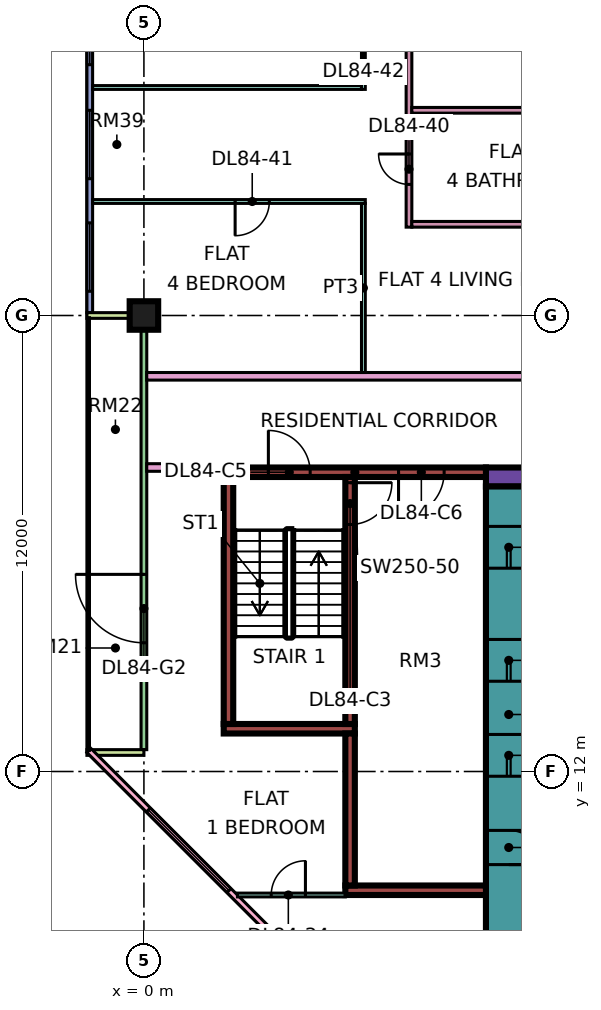
"""IFC4 building model, lengths in metres.
Left out: names, types, materials, properties, quantities, classifications, styles, units other than length and angle.
Written with IfcOpenShell. Run it as: python <this file> out.ifc"""

import sys

from ifc_helpers import new_model, si_unit, direction, frame, frame_2d, origin, origin_2d, place, context, subcontext, project, spatial, rectangle, extrude, element, fill, save


model = new_model("IFC4")
c1 = context("Model", 3, precision=1e-05, world=origin(), true_north=direction((0.0, 1.0)))
c2 = subcontext(c1, "Body", "Model", "MODEL_VIEW")
j1 = project(units=[si_unit("LENGTHUNIT", "METRE"), si_unit("PLANEANGLEUNIT", "RADIAN")], contexts=[c1])
p1 = place(None, origin())
s1 = spatial("IfcSite", under=j1, at=p1, CompositionType="ELEMENT")
p2 = place(p1, origin())
s2 = spatial("IfcBuilding", under=s1, at=p2, CompositionType="ELEMENT")
p3 = place(p2, frame((0.0, 0.0, 361.4)))
s3 = spatial("IfcBuildingStorey", under=s2, at=p3, CompositionType="ELEMENT", Elevation=361.4)
p4 = place(p3, frame((0.0, 24.0, 0.0), z_axis=(0.0, 0.0, 1.0), x_axis=(1.0, 0.0, 0.0)))
e1 = element("IfcColumn", 1, at=p4, inside=s3, PredefinedType="COLUMN", context=c2, shape_type="SweptSolid", body=[
    extrude(rectangle(XDim=0.75, YDim=0.75, at=origin_2d()), origin(), (0.0, 0.0, 1.0), 3.75),
])
p5 = place(p3, frame((9.0, 19.75, 0.0), z_axis=(0.0, 0.0, 1.0), x_axis=(1.0, 0.0, 0.0)))
e2 = element("IfcWall", 2, at=p5, inside=s3, PredefinedType="SHEAR", context=c2, shape_type="SweptSolid", body=[
    extrude(rectangle(XDim=25.0, YDim=0.5, at=frame_2d((12.5, 0.0))), origin(), (0.0, 0.0, 1.0), 3.75),
])
p6 = place(p5, frame((19.1, 0.0, 0.0)))
e3 = element("IfcOpeningElement", 3, at=p6, cuts=e2, PredefinedType="OPENING", context=c2, shape_type="SweptSolid", body=[
    extrude(rectangle(XDim=1.8, YDim=2.4, at=frame_2d((0.9, 1.2))), frame((0.0, 0.26, 0.0), z_axis=(0.0, -1.0, 0.0), x_axis=(1.0, 0.0, 0.0)), (0.0, 0.0, 1.0), 0.52),
])
p7 = place(p3, frame((9.6, 7.5, 0.0), z_axis=(0.0, 0.0, 1.0), x_axis=(0.0, 1.0, 0.0)))
e4 = element("IfcWall", 4, at=p7, inside=s3, PredefinedType="SHEAR", context=c2, shape_type="SweptSolid", body=[
    extrude(rectangle(XDim=12.0, YDim=1.2, at=frame_2d((6.0, 0.0))), origin(), (0.0, 0.0, 1.0), 3.75),
])
p8 = place(p7, frame((4.375, 0.0, 0.0)))
e5 = element("IfcOpeningElement", 5, at=p8, cuts=e4, PredefinedType="OPENING", context=c2, shape_type="SweptSolid", body=[
    extrude(rectangle(XDim=1.1, YDim=2.2, at=frame_2d((0.55, 1.1))), frame((0.0, 0.61, 0.0), z_axis=(0.0, -1.0, 0.0), x_axis=(1.0, 0.0, 0.0)), (0.0, 0.0, 1.0), 1.22),
])
p9 = place(p7, frame((6.875, 0.0, 0.0)))
e6 = element("IfcOpeningElement", 6, at=p9, cuts=e4, PredefinedType="OPENING", context=c2, shape_type="SweptSolid", body=[
    extrude(rectangle(XDim=1.1, YDim=2.2, at=frame_2d((0.55, 1.1))), frame((0.0, 0.61, 0.0), z_axis=(0.0, -1.0, 0.0), x_axis=(1.0, 0.0, 0.0)), (0.0, 0.0, 1.0), 1.22),
])
p10 = place(p7, frame((9.85, 0.0, 0.0)))
e7 = element("IfcOpeningElement", 7, at=p10, cuts=e4, PredefinedType="OPENING", context=c2, shape_type="SweptSolid", body=[
    extrude(rectangle(XDim=1.1, YDim=2.2, at=frame_2d((0.55, 1.1))), frame((0.0, 0.61, 0.0), z_axis=(0.0, -1.0, 0.0), x_axis=(1.0, 0.0, 0.0)), (0.0, 0.0, 1.0), 1.22),
])
p11 = place(p7, frame((2.05, 0.0, 0.0)))
e8 = element("IfcOpeningElement", 8, at=p11, cuts=e4, PredefinedType="OPENING", context=c2, shape_type="SweptSolid", body=[
    extrude(rectangle(XDim=0.9, YDim=2.1, at=frame_2d((0.45, 1.05))), frame((0.0, 0.61, 0.0), z_axis=(0.0, -1.0, 0.0), x_axis=(1.0, 0.0, 0.0)), (0.0, 0.0, 1.0), 1.22),
])
p12 = place(p3, frame((2.1, 19.875, 0.0), z_axis=(0.0, 0.0, 1.0), x_axis=(1.0, 0.0, 0.0)))
e9 = element("IfcWall", 9, at=p12, inside=s3, PredefinedType="SHEAR", context=c2, shape_type="SweptSolid", body=[
    extrude(rectangle(XDim=6.9, YDim=0.25, at=frame_2d((3.45, 0.0))), origin(), (0.0, 0.0, 1.0), 3.75),
])
p13 = place(p12, frame((1.175, 0.0, 0.0)))
e10 = element("IfcOpeningElement", 10, at=p13, cuts=e9, PredefinedType="OPENING", context=c2, shape_type="SweptSolid", body=[
    extrude(rectangle(XDim=1.1, YDim=2.2, at=frame_2d((0.55, 1.1))), frame((0.0, 0.135, 0.0), z_axis=(0.0, -1.0, 0.0), x_axis=(1.0, 0.0, 0.0)), (0.0, 0.0, 1.0), 0.27),
])
p14 = place(p12, frame((4.6, 0.0, 0.0)))
e11 = element("IfcOpeningElement", 11, at=p14, cuts=e9, PredefinedType="OPENING", context=c2, shape_type="SweptSolid", body=[
    extrude(rectangle(XDim=1.2, YDim=2.2, at=frame_2d((0.6, 1.1))), frame((0.0, 0.135, 0.0), z_axis=(0.0, -1.0, 0.0), x_axis=(1.0, 0.0, 0.0)), (0.0, 0.0, 1.0), 0.27),
])
p15 = place(p3, frame((2.1, 13.125, 0.0), z_axis=(0.0, 0.0, 1.0), x_axis=(1.0, 0.0, 0.0)))
e12 = element("IfcWall", 12, at=p15, inside=s3, PredefinedType="SHEAR", context=c2, shape_type="SweptSolid", body=[
    extrude(rectangle(XDim=3.45, YDim=0.25, at=frame_2d((1.725, 0.0))), origin(), (0.0, 0.0, 1.0), 3.75),
])
p16 = place(p3, frame((2.225, 13.25, 0.0), z_axis=(0.0, 0.0, 1.0), x_axis=(0.0, 1.0, 0.0)))
e13 = element("IfcWall", 13, at=p16, inside=s3, PredefinedType="SHEAR", context=c2, shape_type="SweptSolid", body=[
    extrude(rectangle(XDim=6.5, YDim=0.25, at=frame_2d((3.25, 0.0))), origin(), (0.0, 0.0, 1.0), 3.75),
])
p17 = place(p3, frame((5.425, 13.25, 0.0), z_axis=(0.0, 0.0, 1.0), x_axis=(0.0, 1.0, 0.0)))
e14 = element("IfcWall", 14, at=p17, inside=s3, PredefinedType="SHEAR", context=c2, shape_type="SweptSolid", body=[
    extrude(rectangle(XDim=6.5, YDim=0.25, at=frame_2d((3.25, 0.0))), origin(), (0.0, 0.0, 1.0), 3.75),
])
p18 = place(p17, frame((5.25, 0.0, 0.0)))
e15 = element("IfcOpeningElement", 15, at=p18, cuts=e14, PredefinedType="OPENING", context=c2, shape_type="SweptSolid", body=[
    extrude(rectangle(XDim=1.1, YDim=2.2, at=frame_2d((0.55, 1.1))), frame((0.0, 0.135, 0.0), z_axis=(0.0, -1.0, 0.0), x_axis=(1.0, 0.0, 0.0)), (0.0, 0.0, 1.0), 0.27),
])
p19 = place(p3, frame((5.3, 8.875, 0.0), z_axis=(0.0, 0.0, 1.0), x_axis=(1.0, 0.0, 0.0)))
e16 = element("IfcWall", 16, at=p19, inside=s3, PredefinedType="SHEAR", context=c2, shape_type="SweptSolid", body=[
    extrude(rectangle(XDim=3.7, YDim=0.25, at=frame_2d((1.85, 0.0))), origin(), (0.0, 0.0, 1.0), 3.75),
])
p20 = place(p3, frame((5.425, 9.0, 0.0), z_axis=(0.0, 0.0, 1.0), x_axis=(0.0, 1.0, 0.0)))
e17 = element("IfcWall", 17, at=p20, inside=s3, PredefinedType="SHEAR", context=c2, shape_type="SweptSolid", body=[
    extrude(rectangle(XDim=4.0, YDim=0.25, at=frame_2d((2.0, 0.0))), origin(), (0.0, 0.0, 1.0), 3.75),
])
p21 = place(p3, frame((-1.425, 35.925, 0.0), z_axis=(0.0, 0.0, 1.0), x_axis=(0.0, -1.0, 0.0)))
e18 = element("IfcWall", 18, at=p21, inside=s3, PredefinedType="SOLIDWALL", context=c2, shape_type="SweptSolid", body=[
    extrude(rectangle(XDim=11.85, YDim=0.15, at=frame_2d((5.925, 0.0))), origin(), (0.0, 0.0, 1.0), 3.35),
])
p22 = place(p21, frame((0.562, 0.0, 0.45)))
e19 = element("IfcOpeningElement", 19, at=p22, cuts=e18, PredefinedType="OPENING", context=c2, shape_type="SweptSolid", body=[
    extrude(rectangle(XDim=1.8, YDim=2.4, at=frame_2d((0.9, 1.2))), frame((0.0, 0.085, 0.0), z_axis=(0.0, -1.0, 0.0), x_axis=(1.0, 0.0, 0.0)), (0.0, 0.0, 1.0), 0.17),
])
p23 = place(p21, frame((3.525, 0.0, 0.45)))
e20 = element("IfcOpeningElement", 20, at=p23, cuts=e18, PredefinedType="OPENING", context=c2, shape_type="SweptSolid", body=[
    extrude(rectangle(XDim=1.8, YDim=2.4, at=frame_2d((0.9, 1.2))), frame((0.0, 0.085, 0.0), z_axis=(0.0, -1.0, 0.0), x_axis=(1.0, 0.0, 0.0)), (0.0, 0.0, 1.0), 0.17),
])
p24 = place(p21, frame((6.525, 0.0, 0.45)))
e21 = element("IfcOpeningElement", 21, at=p24, cuts=e18, PredefinedType="OPENING", context=c2, shape_type="SweptSolid", body=[
    extrude(rectangle(XDim=1.8, YDim=2.4, at=frame_2d((0.9, 1.2))), frame((0.0, 0.085, 0.0), z_axis=(0.0, -1.0, 0.0), x_axis=(1.0, 0.0, 0.0)), (0.0, 0.0, 1.0), 0.17),
])
p25 = place(p21, frame((9.488, 0.0, 0.45)))
e22 = element("IfcOpeningElement", 22, at=p25, cuts=e18, PredefinedType="OPENING", context=c2, shape_type="SweptSolid", body=[
    extrude(rectangle(XDim=1.8, YDim=2.4, at=frame_2d((0.9, 1.2))), frame((0.0, 0.085, 0.0), z_axis=(0.0, -1.0, 0.0), x_axis=(1.0, 0.0, 0.0)), (0.0, 0.0, 1.0), 0.17),
])
p26 = place(p3, frame((0.0, 23.925, 0.0), z_axis=(0.0, 0.0, 1.0), x_axis=(0.0, -1.0, 0.0)))
e23 = element("IfcWall", 23, at=p26, inside=s3, PredefinedType="SOLIDWALL", context=c2, shape_type="SweptSolid", body=[
    extrude(rectangle(XDim=11.35, YDim=0.15, at=frame_2d((5.675, 0.0))), origin(), (0.0, 0.0, 1.0), 3.35),
])
p27 = place(p26, frame((6.738, 0.0, 0.0)))
e24 = element("IfcOpeningElement", 24, at=p27, cuts=e23, PredefinedType="OPENING", context=c2, shape_type="SweptSolid", body=[
    extrude(rectangle(XDim=1.8, YDim=2.4, at=frame_2d((0.9, 1.2))), frame((0.0, 0.085, 0.0), z_axis=(0.0, -1.0, 0.0), x_axis=(1.0, 0.0, 0.0)), (0.0, 0.0, 1.0), 0.17),
])
for number, where, z_axis, x_axis in (
    (25, (-1.5, 24.0, 0.0), (0.0, 0.0, 1.0), (1.0, 0.0, 0.0)),
    (26, (-1.5, 12.5, 0.0), (0.0, 0.0, 1.0), (1.0, 0.0, 0.0)),
):
    element("IfcWall", number, at=place(p3, frame(where, z_axis=z_axis, x_axis=x_axis)), inside=s3, PredefinedType="SOLIDWALL", context=c2, shape_type="SweptSolid", body=[
        extrude(rectangle(XDim=1.5, YDim=0.15, at=frame_2d((0.75, 0.0))), origin(), (0.0, 0.0, 1.0), 3.35),
    ])
p28 = place(p3, frame((-1.447, 12.553, 0.0), z_axis=(0.0, 0.0, 1.0), x_axis=(0.707106781187, -0.707106781187, 0.0)))
e27 = element("IfcWall", 27, at=p28, inside=s3, PredefinedType="SOLIDWALL", context=c2, shape_type="SweptSolid", body=[
    extrude(rectangle(XDim=19.799, YDim=0.15, at=frame_2d((9.899, 0.0))), origin(), (0.0, 0.0, 1.0), 3.35),
])
p29 = place(p28, frame((2.212, 0.0, 0.45)))
e28 = element("IfcOpeningElement", 28, at=p29, cuts=e27, PredefinedType="OPENING", context=c2, shape_type="SweptSolid", body=[
    extrude(rectangle(XDim=3.0, YDim=2.4, at=frame_2d((1.5, 1.2))), frame((0.0, 0.085, 0.0), z_axis=(0.0, -1.0, 0.0), x_axis=(1.0, 0.0, 0.0)), (0.0, 0.0, 1.0), 0.17),
])
p30 = place(p28, frame((10.216, 0.0, 0.45)))
e29 = element("IfcOpeningElement", 29, at=p30, cuts=e27, PredefinedType="OPENING", context=c2, shape_type="SweptSolid", body=[
    extrude(rectangle(XDim=3.0, YDim=2.4, at=frame_2d((1.5, 1.2))), frame((0.0, 0.085, 0.0), z_axis=(0.0, -1.0, 0.0), x_axis=(1.0, 0.0, 0.0)), (0.0, 0.0, 1.0), 0.17),
])
p31 = place(p3, frame((-1.35, 27.0, 0.0), z_axis=(0.0, 0.0, 1.0), x_axis=(1.0, 0.0, 0.0)))
e30 = element("IfcWall", 30, at=p31, inside=s3, PredefinedType="PARTITIONING", context=c2, shape_type="SweptSolid", body=[
    extrude(rectangle(XDim=7.175, YDim=0.1, at=frame_2d((3.587, 0.0))), origin(), (0.0, 0.0, 1.0), 3.35),
])
p32 = place(p31, frame((3.75, 0.0, 0.0)))
e31 = element("IfcOpeningElement", 31, at=p32, cuts=e30, PredefinedType="OPENING", context=c2, shape_type="SweptSolid", body=[
    extrude(rectangle(XDim=0.9, YDim=2.1, at=frame_2d((0.45, 1.05))), frame((0.0, 0.06, 0.0), z_axis=(0.0, -1.0, 0.0), x_axis=(1.0, 0.0, 0.0)), (0.0, 0.0, 1.0), 0.12),
])
p33 = place(p3, frame((-1.35, 30.0, 0.0), z_axis=(0.0, 0.0, 1.0), x_axis=(1.0, 0.0, 0.0)))
e32 = element("IfcWall", 32, at=p33, inside=s3, PredefinedType="PARTITIONING", context=c2, shape_type="SweptSolid", body=[
    extrude(rectangle(XDim=7.075, YDim=0.1, at=frame_2d((3.538, 0.0))), origin(), (0.0, 0.0, 1.0), 3.35),
])
p34 = place(p3, frame((0.074, 20.0, 0.0), z_axis=(0.0, 0.0, 1.0), x_axis=(1.0, 0.0, 0.0)))
e33 = element("IfcWall", 33, at=p34, inside=s3, PredefinedType="PARTITIONING", context=c2, shape_type="SweptSolid", body=[
    extrude(rectangle(XDim=2.026, YDim=0.2, at=frame_2d((1.013, 0.0))), origin(), (0.0, 0.0, 1.0), 3.35),
])
p35 = place(p3, frame((0.074, 22.4, 0.0), z_axis=(0.0, 0.0, 1.0), x_axis=(1.0, 0.0, 0.0)))
e34 = element("IfcWall", 34, at=p35, inside=s3, PredefinedType="PARTITIONING", context=c2, shape_type="SweptSolid", body=[
    extrude(rectangle(XDim=12.201, YDim=0.2, at=frame_2d((6.101, 0.0))), origin(), (0.0, 0.0, 1.0), 3.35),
])
p36 = place(p3, frame((2.461, 8.75, 0.0), z_axis=(0.0, 0.0, 1.0), x_axis=(1.0, 0.0, 0.0)))
e35 = element("IfcWall", 35, at=p36, inside=s3, PredefinedType="PARTITIONING", context=c2, shape_type="SweptSolid", body=[
    extrude(rectangle(XDim=2.839, YDim=0.1, at=frame_2d((1.419, 0.0))), origin(), (0.0, 0.0, 1.0), 3.35),
])
p37 = place(p36, frame((0.889, 0.0, 0.0)))
e36 = element("IfcOpeningElement", 36, at=p37, cuts=e35, PredefinedType="OPENING", context=c2, shape_type="SweptSolid", body=[
    extrude(rectangle(XDim=0.9, YDim=2.1, at=frame_2d((0.45, 1.05))), frame((0.0, 0.06, 0.0), z_axis=(0.0, -1.0, 0.0), x_axis=(1.0, 0.0, 0.0)), (0.0, 0.0, 1.0), 0.12),
])
p38 = place(p3, frame((5.775, 22.5, 0.0), z_axis=(0.0, 0.0, 1.0), x_axis=(0.0, 1.0, 0.0)))
e37 = element("IfcWall", 37, at=p38, inside=s3, PredefinedType="PARTITIONING", context=c2, shape_type="SweptSolid", body=[
    extrude(rectangle(XDim=4.45, YDim=0.1, at=frame_2d((2.225, 0.0))), origin(), (0.0, 0.0, 1.0), 3.35),
])
p39 = place(p3, frame((5.775, 29.95, 0.0), z_axis=(0.0, 0.0, 1.0), x_axis=(0.0, 1.0, 0.0)))
e38 = element("IfcWall", 38, at=p39, inside=s3, PredefinedType="PARTITIONING", context=c2, shape_type="SweptSolid", body=[
    extrude(rectangle(XDim=5.95, YDim=0.1, at=frame_2d((2.975, 0.0))), origin(), (0.0, 0.0, 1.0), 3.35),
])
p40 = place(p39, frame((1.1, 0.0, 0.0)))
e39 = element("IfcOpeningElement", 39, at=p40, cuts=e38, PredefinedType="OPENING", context=c2, shape_type="SweptSolid", body=[
    extrude(rectangle(XDim=0.9, YDim=2.1, at=frame_2d((0.45, 1.05))), frame((0.0, 0.06, 0.0), z_axis=(0.0, -1.0, 0.0), x_axis=(1.0, 0.0, 0.0)), (0.0, 0.0, 1.0), 0.12),
])
p41 = place(p39, frame((4.1, 0.0, 0.0)))
e40 = element("IfcOpeningElement", 40, at=p41, cuts=e38, PredefinedType="OPENING", context=c2, shape_type="SweptSolid", body=[
    extrude(rectangle(XDim=0.9, YDim=2.1, at=frame_2d((0.45, 1.05))), frame((0.0, 0.06, 0.0), z_axis=(0.0, -1.0, 0.0), x_axis=(1.0, 0.0, 0.0)), (0.0, 0.0, 1.0), 0.12),
])
p42 = place(p3, frame((6.975, 26.325, 0.0), z_axis=(0.0, 0.0, 1.0), x_axis=(0.0, 1.0, 0.0)))
e41 = element("IfcWall", 41, at=p42, inside=s3, PredefinedType="PARTITIONING", context=c2, shape_type="SweptSolid", body=[
    extrude(rectangle(XDim=9.575, YDim=0.15, at=frame_2d((4.788, 0.0))), origin(), (0.0, 0.0, 1.0), 3.35),
])
p43 = place(p42, frame((1.125, 0.0, 0.0)))
e42 = element("IfcOpeningElement", 42, at=p43, cuts=e41, PredefinedType="OPENING", context=c2, shape_type="SweptSolid", body=[
    extrude(rectangle(XDim=0.8, YDim=2.1, at=frame_2d((0.4, 1.05))), frame((0.0, 0.085, 0.0), z_axis=(0.0, -1.0, 0.0), x_axis=(1.0, 0.0, 0.0)), (0.0, 0.0, 1.0), 0.17),
])
p44 = place(p42, frame((5.925, 0.0, 0.0)))
e43 = element("IfcOpeningElement", 43, at=p44, cuts=e41, PredefinedType="OPENING", context=c2, shape_type="SweptSolid", body=[
    extrude(rectangle(XDim=0.9, YDim=2.1, at=frame_2d((0.45, 1.05))), frame((0.0, 0.085, 0.0), z_axis=(0.0, -1.0, 0.0), x_axis=(1.0, 0.0, 0.0)), (0.0, 0.0, 1.0), 0.17),
])
for number, where, z_axis, x_axis in (
    (44, (7.05, 26.4, 0.0), (0.0, 0.0, 1.0), (1.0, 0.0, 0.0)),
    (45, (7.05, 29.4, 0.0), (0.0, 0.0, 1.0), (1.0, 0.0, 0.0)),
):
    element("IfcWall", number, at=place(p3, frame(where, z_axis=z_axis, x_axis=x_axis)), inside=s3, PredefinedType="PARTITIONING", context=c2, shape_type="SweptSolid", body=[
        extrude(rectangle(XDim=5.225, YDim=0.15, at=frame_2d((2.612, 0.0))), origin(), (0.0, 0.0, 1.0), 3.35),
    ])
p45 = place(p23, origin())
e46 = element("IfcWindow", 46, at=p45, inside=s3, PartitioningType="SINGLE_PANEL", PredefinedType="WINDOW", context=c2, shape_type="SweptSolid", body=[
    extrude(rectangle(XDim=1.8, YDim=2.4, at=frame_2d((0.9, 1.2))), frame((0.0, 0.03, 0.0), z_axis=(0.0, -1.0, 0.0), x_axis=(1.0, 0.0, 0.0)), (0.0, 0.0, 1.0), 0.06),
])
fill(e20, e46)
p46 = place(p24, origin())
e47 = element("IfcWindow", 47, at=p46, inside=s3, PartitioningType="SINGLE_PANEL", PredefinedType="WINDOW", context=c2, shape_type="SweptSolid", body=[
    extrude(rectangle(XDim=1.8, YDim=2.4, at=frame_2d((0.9, 1.2))), frame((0.0, 0.03, 0.0), z_axis=(0.0, -1.0, 0.0), x_axis=(1.0, 0.0, 0.0)), (0.0, 0.0, 1.0), 0.06),
])
fill(e21, e47)
p47 = place(p25, origin())
e48 = element("IfcWindow", 48, at=p47, inside=s3, PartitioningType="SINGLE_PANEL", PredefinedType="WINDOW", context=c2, shape_type="SweptSolid", body=[
    extrude(rectangle(XDim=1.8, YDim=2.4, at=frame_2d((0.9, 1.2))), frame((0.0, 0.03, 0.0), z_axis=(0.0, -1.0, 0.0), x_axis=(1.0, 0.0, 0.0)), (0.0, 0.0, 1.0), 0.06),
])
fill(e22, e48)
p48 = place(p27, frame((1.8, 0.0, 0.0), z_axis=(0.0, 0.0, 1.0), x_axis=(-1.0, 0.0, 0.0)))
e49 = element("IfcDoor", 49, at=p48, inside=s3, OperationType="DOUBLE_DOOR_SINGLE_SWING", PredefinedType="DOOR", context=c2, shape_type="SweptSolid", body=[
    extrude(rectangle(XDim=1.8, YDim=2.4, at=frame_2d((0.9, 1.2))), frame((0.0, 0.025, 0.0), z_axis=(0.0, -1.0, 0.0), x_axis=(1.0, 0.0, 0.0)), (0.0, 0.0, 1.0), 0.05),
])
fill(e24, e49)
p49 = place(p29, origin())
e50 = element("IfcWindow", 50, at=p49, inside=s3, PartitioningType="SINGLE_PANEL", PredefinedType="WINDOW", context=c2, shape_type="SweptSolid", body=[
    extrude(rectangle(XDim=3.0, YDim=2.4, at=frame_2d((1.5, 1.2))), frame((0.0, 0.03, 0.0), z_axis=(0.0, -1.0, 0.0), x_axis=(1.0, 0.0, 0.0)), (0.0, 0.0, 1.0), 0.06),
])
fill(e28, e50)
p50 = place(p8, origin())
e51 = element("IfcDoor", 51, at=p50, inside=s3, OperationType="DOUBLE_DOOR_SLIDING", PredefinedType="DOOR", context=c2, shape_type="SweptSolid", body=[
    extrude(rectangle(XDim=1.1, YDim=2.2, at=frame_2d((0.55, 1.1))), frame((0.0, 0.025, 0.0), z_axis=(0.0, -1.0, 0.0), x_axis=(1.0, 0.0, 0.0)), (0.0, 0.0, 1.0), 0.05),
])
fill(e5, e51)
p51 = place(p9, origin())
e52 = element("IfcDoor", 52, at=p51, inside=s3, OperationType="DOUBLE_DOOR_SLIDING", PredefinedType="DOOR", context=c2, shape_type="SweptSolid", body=[
    extrude(rectangle(XDim=1.1, YDim=2.2, at=frame_2d((0.55, 1.1))), frame((0.0, 0.025, 0.0), z_axis=(0.0, -1.0, 0.0), x_axis=(1.0, 0.0, 0.0)), (0.0, 0.0, 1.0), 0.05),
])
fill(e6, e52)
p52 = place(p10, origin())
e53 = element("IfcDoor", 53, at=p52, inside=s3, OperationType="DOUBLE_DOOR_SLIDING", PredefinedType="DOOR", context=c2, shape_type="SweptSolid", body=[
    extrude(rectangle(XDim=1.1, YDim=2.2, at=frame_2d((0.55, 1.1))), frame((0.0, 0.025, 0.0), z_axis=(0.0, -1.0, 0.0), x_axis=(1.0, 0.0, 0.0)), (0.0, 0.0, 1.0), 0.05),
])
fill(e7, e53)
p53 = place(p18, origin())
e54 = element("IfcDoor", 54, at=p53, inside=s3, OperationType="SINGLE_SWING_RIGHT", PredefinedType="DOOR", context=c2, shape_type="SweptSolid", body=[
    extrude(rectangle(XDim=1.1, YDim=2.2, at=frame_2d((0.55, 1.1))), frame((0.0, 0.025, 0.0), z_axis=(0.0, -1.0, 0.0), x_axis=(1.0, 0.0, 0.0)), (0.0, 0.0, 1.0), 0.05),
])
fill(e15, e54)
p54 = place(p11, frame((0.9, 0.0, 0.0), z_axis=(0.0, 0.0, 1.0), x_axis=(-1.0, 0.0, 0.0)))
e55 = element("IfcDoor", 55, at=p54, inside=s3, OperationType="SINGLE_SWING_LEFT", PredefinedType="DOOR", context=c2, shape_type="SweptSolid", body=[
    extrude(rectangle(XDim=0.9, YDim=2.1, at=frame_2d((0.45, 1.05))), frame((0.0, 0.025, 0.0), z_axis=(0.0, -1.0, 0.0), x_axis=(1.0, 0.0, 0.0)), (0.0, 0.0, 1.0), 0.05),
])
fill(e8, e55)
p55 = place(p13, origin())
e56 = element("IfcDoor", 56, at=p55, inside=s3, OperationType="SINGLE_SWING_LEFT", PredefinedType="DOOR", context=c2, shape_type="SweptSolid", body=[
    extrude(rectangle(XDim=1.1, YDim=2.2, at=frame_2d((0.55, 1.1))), frame((0.0, 0.025, 0.0), z_axis=(0.0, -1.0, 0.0), x_axis=(1.0, 0.0, 0.0)), (0.0, 0.0, 1.0), 0.05),
])
fill(e10, e56)
p56 = place(p14, frame((1.2, 0.0, 0.0), z_axis=(0.0, 0.0, 1.0), x_axis=(-1.0, 0.0, 0.0)))
e57 = element("IfcDoor", 57, at=p56, inside=s3, OperationType="SINGLE_SWING_LEFT", PredefinedType="DOOR", context=c2, shape_type="SweptSolid", body=[
    extrude(rectangle(XDim=1.2, YDim=2.2, at=frame_2d((0.6, 1.1))), frame((0.0, 0.025, 0.0), z_axis=(0.0, -1.0, 0.0), x_axis=(1.0, 0.0, 0.0)), (0.0, 0.0, 1.0), 0.05),
])
fill(e11, e57)
p57 = place(p37, frame((0.9, 0.0, 0.0), z_axis=(0.0, 0.0, 1.0), x_axis=(-1.0, 0.0, 0.0)))
e58 = element("IfcDoor", 58, at=p57, inside=s3, OperationType="SINGLE_SWING_RIGHT", PredefinedType="DOOR", context=c2, shape_type="SweptSolid", body=[
    extrude(rectangle(XDim=0.9, YDim=2.1, at=frame_2d((0.45, 1.05))), frame((0.0, 0.025, 0.0), z_axis=(0.0, -1.0, 0.0), x_axis=(1.0, 0.0, 0.0)), (0.0, 0.0, 1.0), 0.05),
])
fill(e36, e58)
p58 = place(p43, frame((0.8, 0.0, 0.0), z_axis=(0.0, 0.0, 1.0), x_axis=(-1.0, 0.0, 0.0)))
e59 = element("IfcDoor", 59, at=p58, inside=s3, OperationType="SINGLE_SWING_RIGHT", PredefinedType="DOOR", context=c2, shape_type="SweptSolid", body=[
    extrude(rectangle(XDim=0.8, YDim=2.1, at=frame_2d((0.4, 1.05))), frame((0.0, 0.025, 0.0), z_axis=(0.0, -1.0, 0.0), x_axis=(1.0, 0.0, 0.0)), (0.0, 0.0, 1.0), 0.05),
])
fill(e42, e59)
p59 = place(p32, frame((0.9, 0.0, 0.0), z_axis=(0.0, 0.0, 1.0), x_axis=(-1.0, 0.0, 0.0)))
e60 = element("IfcDoor", 60, at=p59, inside=s3, OperationType="SINGLE_SWING_LEFT", PredefinedType="DOOR", context=c2, shape_type="SweptSolid", body=[
    extrude(rectangle(XDim=0.9, YDim=2.1, at=frame_2d((0.45, 1.05))), frame((0.0, 0.025, 0.0), z_axis=(0.0, -1.0, 0.0), x_axis=(1.0, 0.0, 0.0)), (0.0, 0.0, 1.0), 0.05),
])
fill(e31, e60)
save(model, sys.argv[1])
